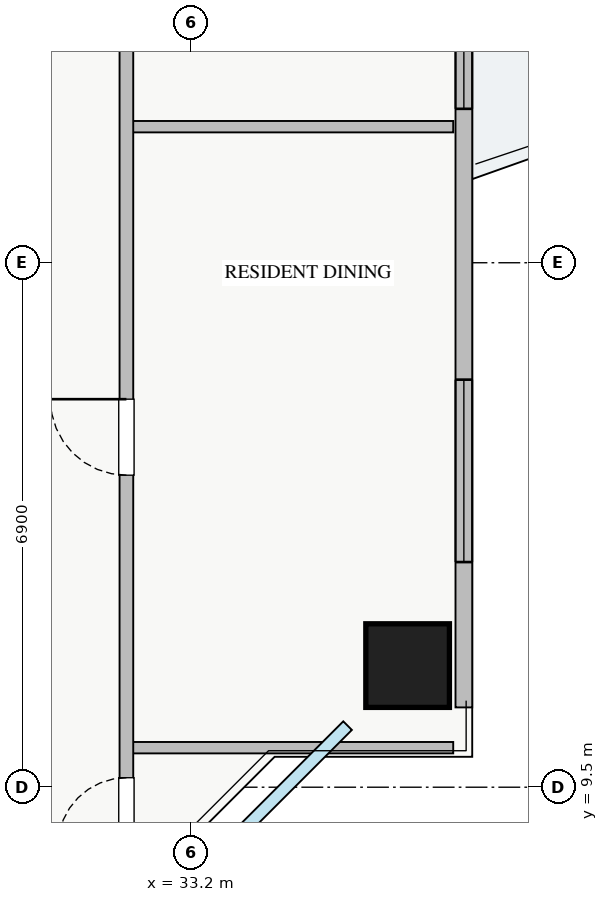
"""IFC4 building model, lengths in metres.
Left out: names, types, materials, properties, quantities, classifications, styles, units other than length and angle.
Written with IfcOpenShell. Run it as: python <this file> out.ifc"""

import sys

from ifc_helpers import new_model, si_unit, direction, frame, frame_2d, origin, origin_2d, place, context, subcontext, project, spatial, rectangle, extrude, source, transform, mapped, element, fill, save


model = new_model("IFC4")
c1 = context("Model", 3, precision=1e-05, world=origin(), true_north=direction((0.0, 1.0)))
c2 = subcontext(c1, "Body", "Model", "MODEL_VIEW")
j1 = project(units=[si_unit("LENGTHUNIT", "METRE"), si_unit("PLANEANGLEUNIT", "RADIAN")], contexts=[c1])
p1 = place(None, origin())
s1 = spatial("IfcSite", under=j1, at=p1, CompositionType="ELEMENT")
p2 = place(p1, origin())
s2 = spatial("IfcBuilding", under=s1, at=p2, CompositionType="ELEMENT")
p3 = place(p2, frame((0.0, 0.0, 126.25)))
s3 = spatial("IfcBuildingStorey", under=s2, at=p3, CompositionType="ELEMENT", Elevation=126.25)
m1 = source(origin(), c2, "Body", "SweptSolid", [
    extrude(rectangle(XDim=1.1, YDim=1.1, at=origin_2d()), origin(), (0.0, 0.0, 1.0), 3.25),
])
p4 = place(p3, frame((36.05, 11.1, 0.0), z_axis=(0.0, 0.0, 1.0), x_axis=(1.0, 0.0, 0.0)))
e1 = element("IfcColumn", 1, at=p4, inside=s3, PredefinedType="COLUMN", context=c2, shape_type="MappedRepresentation", body=[
    mapped(m1, transform((0.0, 0.0, 0.0), x_axis=(1.0, 0.0, 0.0), y_axis=(0.0, 1.0, 0.0), z_axis=(0.0, 0.0, 1.0), scale=1.0)),
])
p5 = place(p3, frame((36.79, 10.55, 0.0), z_axis=(0.0, 0.0, 1.0), x_axis=(0.0, 1.0, 0.0)))
e2 = element("IfcWall", 2, at=p5, inside=s3, PredefinedType="STANDARD", context=c2, shape_type="SweptSolid", body=[
    extrude(rectangle(XDim=24.9, YDim=0.22, at=frame_2d((12.45, 0.0))), origin(), (0.0, 0.0, 1.0), 2.61),
])
p6 = place(p5, frame((13.3, 0.0, 0.0)))
e3 = element("IfcOpeningElement", 3, at=p6, cuts=e2, PredefinedType="OPENING", context=c2, shape_type="SweptSolid", body=[
    extrude(rectangle(XDim=1.2, YDim=2.1, at=frame_2d((0.6, 1.05))), frame((0.0, 0.12, 0.0), z_axis=(0.0, -1.0, 0.0), x_axis=(1.0, 0.0, 0.0)), (0.0, 0.0, 1.0), 0.24),
])
p7 = place(p5, frame((1.912, 0.0, 0.9)))
e4 = element("IfcOpeningElement", 4, at=p7, cuts=e2, PredefinedType="OPENING", context=c2, shape_type="SweptSolid", body=[
    extrude(rectangle(XDim=2.4, YDim=1.48, at=frame_2d((1.2, 0.74))), frame((0.0, 0.12, 0.0), z_axis=(0.0, -1.0, 0.0), x_axis=(1.0, 0.0, 0.0)), (0.0, 0.0, 1.0), 0.24),
])
p8 = place(p5, frame((22.165, 0.0, 0.9)))
e5 = element("IfcOpeningElement", 5, at=p8, cuts=e2, PredefinedType="OPENING", context=c2, shape_type="SweptSolid", body=[
    extrude(rectangle(XDim=2.1, YDim=1.5, at=frame_2d((1.05, 0.75))), frame((0.0, 0.12, 0.0), z_axis=(0.0, -1.0, 0.0), x_axis=(1.0, 0.0, 0.0)), (0.0, 0.0, 1.0), 0.24),
])
p9 = place(p5, frame((18.093, 0.0, 0.9)))
e6 = element("IfcOpeningElement", 6, at=p9, cuts=e2, PredefinedType="OPENING", context=c2, shape_type="SweptSolid", body=[
    extrude(rectangle(XDim=2.4, YDim=1.5, at=frame_2d((1.2, 0.75))), frame((0.0, 0.12, 0.0), z_axis=(0.0, -1.0, 0.0), x_axis=(1.0, 0.0, 0.0)), (0.0, 0.0, 1.0), 0.24),
])
p10 = place(p5, frame((7.875, 0.0, 0.9)))
e7 = element("IfcOpeningElement", 7, at=p10, cuts=e2, PredefinedType="OPENING", context=c2, shape_type="SweptSolid", body=[
    extrude(rectangle(XDim=0.9, YDim=1.2, at=frame_2d((0.45, 0.6))), frame((0.0, 0.12, 0.0), z_axis=(0.0, -1.0, 0.0), x_axis=(1.0, 0.0, 0.0)), (0.0, 0.0, 1.0), 0.24),
])
p11 = place(p3, frame((32.35, 10.02, 0.0), z_axis=(0.0, 0.0, 1.0), x_axis=(1.0, 0.0, 0.0)))
e8 = element("IfcWall", 8, at=p11, inside=s3, PredefinedType="PARTITIONING", context=c2, shape_type="SweptSolid", body=[
    extrude(rectangle(XDim=4.3, YDim=0.15, at=frame_2d((2.15, 0.0))), origin(), (0.0, 0.0, 1.0), 3.07),
])
p12 = place(p3, frame((32.35, 18.19, 0.0), z_axis=(0.0, 0.0, 1.0), x_axis=(1.0, 0.0, 0.0)))
e9 = element("IfcWall", 9, at=p12, inside=s3, PredefinedType="PARTITIONING", context=c2, shape_type="SweptSolid", body=[
    extrude(rectangle(XDim=4.3, YDim=0.15, at=frame_2d((2.15, 0.0))), origin(), (0.0, 0.0, 1.0), 2.815),
])
p13 = place(p3, frame((32.35, 8.31, 0.0), z_axis=(0.0, 0.0, 1.0), x_axis=(0.0, 1.0, 0.0)))
e10 = element("IfcWall", 10, at=p13, inside=s3, PredefinedType="PARTITIONING", context=c2, shape_type="SweptSolid", body=[
    extrude(rectangle(XDim=29.37, YDim=0.18, at=frame_2d((14.685, 0.0))), origin(), (0.0, 0.0, 1.0), 3.07),
])
p14 = place(p13, frame((28.06, 0.0, 0.0)))
e11 = element("IfcOpeningElement", 11, at=p14, cuts=e10, PredefinedType="OPENING", context=c2, shape_type="SweptSolid", body=[
    extrude(rectangle(XDim=0.9, YDim=2.05, at=frame_2d((0.45, 1.025))), frame((0.0, 0.1, 0.0), z_axis=(0.0, -1.0, 0.0), x_axis=(1.0, 0.0, 0.0)), (0.0, 0.0, 1.0), 0.2),
])
p15 = place(p13, frame((0.415, 0.0, 0.0)))
e12 = element("IfcOpeningElement", 12, at=p15, cuts=e10, PredefinedType="OPENING", context=c2, shape_type="SweptSolid", body=[
    extrude(rectangle(XDim=0.9, YDim=2.05, at=frame_2d((0.45, 1.025))), frame((0.0, 0.1, 0.0), z_axis=(0.0, -1.0, 0.0), x_axis=(1.0, 0.0, 0.0)), (0.0, 0.0, 1.0), 0.2),
])
p16 = place(p13, frame((5.295, 0.0, 0.0)))
e13 = element("IfcOpeningElement", 13, at=p16, cuts=e10, PredefinedType="OPENING", context=c2, shape_type="SweptSolid", body=[
    extrude(rectangle(XDim=1.0, YDim=2.05, at=frame_2d((0.5, 1.025))), frame((0.0, 0.1, 0.0), z_axis=(0.0, -1.0, 0.0), x_axis=(1.0, 0.0, 0.0)), (0.0, 0.0, 1.0), 0.2),
])
p17 = place(p13, frame((11.645, 0.0, 0.0)))
e14 = element("IfcOpeningElement", 14, at=p17, cuts=e10, PredefinedType="OPENING", context=c2, shape_type="SweptSolid", body=[
    extrude(rectangle(XDim=1.0, YDim=2.05, at=frame_2d((0.5, 1.025))), frame((0.0, 0.1, 0.0), z_axis=(0.0, -1.0, 0.0), x_axis=(1.0, 0.0, 0.0)), (0.0, 0.0, 1.0), 0.2),
])
p18 = place(p13, frame((20.835, 0.0, 0.0)))
e15 = element("IfcOpeningElement", 15, at=p18, cuts=e10, PredefinedType="OPENING", context=c2, shape_type="SweptSolid", body=[
    extrude(rectangle(XDim=1.0, YDim=2.05, at=frame_2d((0.5, 1.025))), frame((0.0, 0.1, 0.0), z_axis=(0.0, -1.0, 0.0), x_axis=(1.0, 0.0, 0.0)), (0.0, 0.0, 1.0), 0.2),
])
m2 = source(origin(), c2, "Body", "SweptSolid", [
    extrude(rectangle(XDim=2.4, YDim=1.48, at=frame_2d((1.2, 0.74))), frame((0.0, 0.03, 0.0), z_axis=(0.0, -1.0, 0.0), x_axis=(1.0, 0.0, 0.0)), (0.0, 0.0, 1.0), 0.06),
])
p19 = place(p7, origin())
e16 = element("IfcWindow", 16, at=p19, inside=s3, PartitioningType="TRIPLE_PANEL_VERTICAL", PredefinedType="WINDOW", context=c2, shape_type="MappedRepresentation", body=[
    mapped(m2, transform((0.0, 0.0, 0.0), x_axis=(1.0, 0.0, 0.0), y_axis=(0.0, 1.0, 0.0), z_axis=(0.0, 0.0, 1.0), scale=1.0)),
])
fill(e4, e16)
m3 = source(origin(), c2, "Body", "SweptSolid", [
    extrude(rectangle(XDim=0.9, YDim=2.05, at=frame_2d((0.45, 1.025))), frame((0.0, 0.025, 0.0), z_axis=(0.0, -1.0, 0.0), x_axis=(1.0, 0.0, 0.0)), (0.0, 0.0, 1.0), 0.05),
])
p20 = place(p15, origin())
e17 = element("IfcDoor", 17, at=p20, inside=s3, OperationType="SINGLE_SWING_LEFT", PredefinedType="DOOR", context=c2, shape_type="MappedRepresentation", body=[
    mapped(m3, transform((0.0, 0.0, 0.0), x_axis=(1.0, 0.0, 0.0), y_axis=(0.0, 1.0, 0.0), z_axis=(0.0, 0.0, 1.0), scale=1.0)),
])
fill(e12, e17)
m4 = source(origin(), c2, "Body", "SweptSolid", [
    extrude(rectangle(XDim=1.0, YDim=2.05, at=frame_2d((0.5, 1.025))), frame((0.0, 0.025, 0.0), z_axis=(0.0, -1.0, 0.0), x_axis=(1.0, 0.0, 0.0)), (0.0, 0.0, 1.0), 0.05),
])
p21 = place(p16, origin())
e18 = element("IfcDoor", 18, at=p21, inside=s3, OperationType="SINGLE_SWING_RIGHT", PredefinedType="DOOR", context=c2, shape_type="MappedRepresentation", body=[
    mapped(m4, transform((0.0, 0.0, 0.0), x_axis=(1.0, 0.0, 0.0), y_axis=(0.0, 1.0, 0.0), z_axis=(0.0, 0.0, 1.0), scale=1.0)),
])
fill(e13, e18)
m5 = source(origin(), c2, "Body", "SweptSolid", [
    extrude(rectangle(XDim=0.9, YDim=1.2, at=frame_2d((0.45, 0.6))), frame((0.0, 0.03, 0.0), z_axis=(0.0, -1.0, 0.0), x_axis=(1.0, 0.0, 0.0)), (0.0, 0.0, 1.0), 0.06),
])
p22 = place(p10, origin())
e19 = element("IfcWindow", 19, at=p22, inside=s3, PartitioningType="SINGLE_PANEL", PredefinedType="WINDOW", context=c2, shape_type="MappedRepresentation", body=[
    mapped(m5, transform((0.0, 0.0, 0.0), x_axis=(1.0, 0.0, 0.0), y_axis=(0.0, 1.0, 0.0), z_axis=(0.0, 0.0, 1.0), scale=1.0)),
])
fill(e7, e19)
save(model, sys.argv[1])
